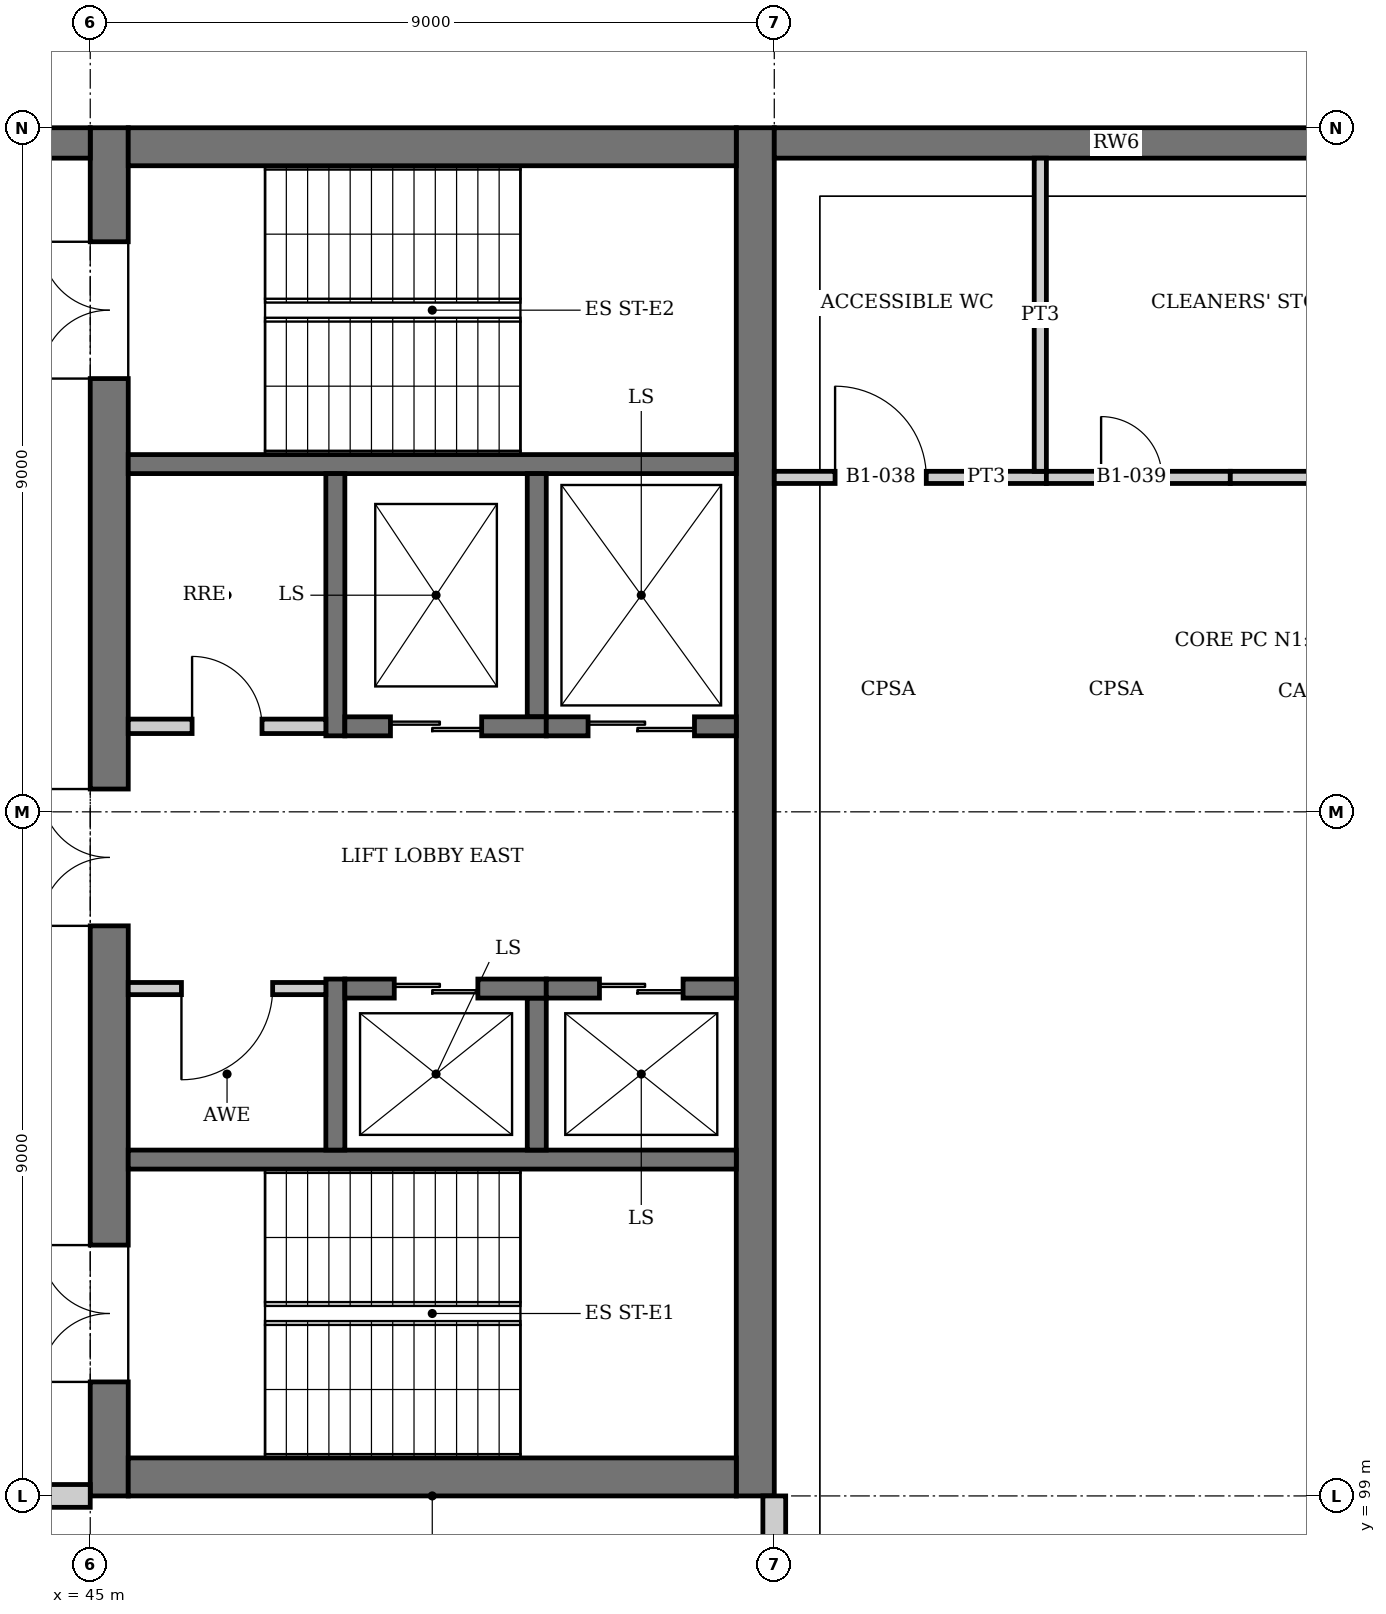
"""IFC4 building model, lengths in metres.
Left out: names, types, materials, properties, quantities, classifications, styles, units other than length and angle.
Written with IfcOpenShell. Run it as: python <this file> out.ifc"""

import sys

from ifc_helpers import new_model, si_unit, direction, frame, frame_2d, origin, place, context, subcontext, project, spatial, rectangle, extrude, element, fill, save


model = new_model("IFC4")
c1 = context("Model", 3, precision=1e-05, world=origin(), true_north=direction((0.0, 1.0)))
c2 = subcontext(c1, "Body", "Model", "MODEL_VIEW")
j1 = project(units=[si_unit("LENGTHUNIT", "METRE"), si_unit("PLANEANGLEUNIT", "RADIAN")], contexts=[c1])
p1 = place(None, origin())
s1 = spatial("IfcSite", under=j1, at=p1, CompositionType="ELEMENT")
p2 = place(p1, origin())
s2 = spatial("IfcBuilding", under=s1, at=p2, CompositionType="ELEMENT")
p3 = place(p2, frame((0.0, 0.0, -4.5)))
s3 = spatial("IfcBuildingStorey", under=s2, at=p3, CompositionType="ELEMENT", Elevation=-4.5)
p4 = place(p3, frame((45.25, 99.0, 0.0), z_axis=(0.0, 0.0, 1.0), x_axis=(0.0, 1.0, 0.0)))
e1 = element("IfcWall", 1, at=p4, inside=s3, PredefinedType="SHEAR", context=c2, shape_type="SweptSolid", body=[
    extrude(rectangle(XDim=18.0, YDim=0.5, at=frame_2d((9.0, 0.0))), origin(), (0.0, 0.0, 1.0), 4.5),
])
p5 = place(p4, frame((1.5, 0.0, 0.0)))
e2 = element("IfcOpeningElement", 2, at=p5, cuts=e1, PredefinedType="OPENING", context=c2, shape_type="SweptSolid", body=[
    extrude(rectangle(XDim=1.8, YDim=2.1, at=frame_2d((0.9, 1.05))), frame((0.0, 0.26, 0.0), z_axis=(0.0, -1.0, 0.0), x_axis=(1.0, 0.0, 0.0)), (0.0, 0.0, 1.0), 0.52),
])
p6 = place(p4, frame((14.7, 0.0, 0.0)))
e3 = element("IfcOpeningElement", 3, at=p6, cuts=e1, PredefinedType="OPENING", context=c2, shape_type="SweptSolid", body=[
    extrude(rectangle(XDim=1.8, YDim=2.1, at=frame_2d((0.9, 1.05))), frame((0.0, 0.26, 0.0), z_axis=(0.0, -1.0, 0.0), x_axis=(1.0, 0.0, 0.0)), (0.0, 0.0, 1.0), 0.52),
])
p7 = place(p4, frame((7.5, 0.0, 0.0)))
e4 = element("IfcOpeningElement", 4, at=p7, cuts=e1, PredefinedType="OPENING", context=c2, shape_type="SweptSolid", body=[
    extrude(rectangle(XDim=1.8, YDim=2.1, at=frame_2d((0.9, 1.05))), frame((0.0, 0.26, 0.0), z_axis=(0.0, -1.0, 0.0), x_axis=(1.0, 0.0, 0.0)), (0.0, 0.0, 1.0), 0.52),
])
p8 = place(p3, frame((53.75, 99.0, 0.0), z_axis=(0.0, 0.0, 1.0), x_axis=(0.0, 1.0, 0.0)))
e5 = element("IfcWall", 5, at=p8, inside=s3, PredefinedType="SHEAR", context=c2, shape_type="SweptSolid", body=[
    extrude(rectangle(XDim=18.0, YDim=0.5, at=frame_2d((9.0, 0.0))), origin(), (0.0, 0.0, 1.0), 4.5),
])
for number, where, z_axis, x_axis in (
    (6, (45.5, 99.25, 0.0), (0.0, 0.0, 1.0), (1.0, 0.0, 0.0)),
    (7, (45.5, 116.75, 0.0), (0.0, 0.0, 1.0), (1.0, 0.0, 0.0)),
):
    element("IfcWall", number, at=place(p3, frame(where, z_axis=z_axis, x_axis=x_axis)), inside=s3, PredefinedType="SHEAR", context=c2, shape_type="SweptSolid", body=[
        extrude(rectangle(XDim=8.0, YDim=0.5, at=frame_2d((4.0, 0.0))), origin(), (0.0, 0.0, 1.0), 4.5),
    ])
p9 = place(p3, frame((36.2, 116.8, 0.0), z_axis=(0.0, 0.0, 1.0), x_axis=(1.0, 0.0, 0.0)))
e8 = element("IfcWall", 8, at=p9, inside=s3, PredefinedType="SOLIDWALL", context=c2, shape_type="SweptSolid", body=[
    extrude(rectangle(XDim=8.8, YDim=0.4, at=frame_2d((4.4, 0.0))), origin(), (0.0, 0.0, 1.0), 4.5),
])
p10 = place(p3, frame((54.0, 116.8, 0.0), z_axis=(0.0, 0.0, 1.0), x_axis=(1.0, 0.0, 0.0)))
e9 = element("IfcWall", 9, at=p10, inside=s3, PredefinedType="SOLIDWALL", context=c2, shape_type="SweptSolid", body=[
    extrude(rectangle(XDim=9.0, YDim=0.4, at=frame_2d((4.5, 0.0))), origin(), (0.0, 0.0, 1.0), 4.5),
])
p11 = place(p3, frame((36.25, 99.0, 0.0), z_axis=(0.0, 0.0, 1.0), x_axis=(1.0, 0.0, 0.0)))
e10 = element("IfcWall", 10, at=p11, inside=s3, PredefinedType="PARTITIONING", context=c2, shape_type="SweptSolid", body=[
    extrude(rectangle(XDim=8.75, YDim=0.3, at=frame_2d((4.375, 0.0))), origin(), (0.0, 0.0, 1.0), 3.34),
])
p12 = place(p11, frame((6.3, 0.0, 0.0)))
e11 = element("IfcOpeningElement", 11, at=p12, cuts=e10, PredefinedType="OPENING", context=c2, shape_type="SweptSolid", body=[
    extrude(rectangle(XDim=1.8, YDim=2.1, at=frame_2d((0.9, 1.05))), frame((0.0, 0.16, 0.0), z_axis=(0.0, -1.0, 0.0), x_axis=(1.0, 0.0, 0.0)), (0.0, 0.0, 1.0), 0.32),
])
p13 = place(p3, frame((54.0, 112.4, 0.0), z_axis=(0.0, 0.0, 1.0), x_axis=(1.0, 0.0, 0.0)))
e12 = element("IfcWall", 12, at=p13, inside=s3, PredefinedType="PARTITIONING", context=c2, shape_type="SweptSolid", body=[
    extrude(rectangle(XDim=3.58, YDim=0.16, at=frame_2d((1.79, 0.0))), origin(), (0.0, 0.0, 1.0), 4.25),
])
p14 = place(p13, frame((0.8, 0.0, 0.0)))
e13 = element("IfcOpeningElement", 13, at=p14, cuts=e12, PredefinedType="OPENING", context=c2, shape_type="SweptSolid", body=[
    extrude(rectangle(XDim=1.2, YDim=2.1, at=frame_2d((0.6, 1.05))), frame((0.0, 0.09, 0.0), z_axis=(0.0, -1.0, 0.0), x_axis=(1.0, 0.0, 0.0)), (0.0, 0.0, 1.0), 0.18),
])
p15 = place(p3, frame((57.58, 112.4, 0.0), z_axis=(0.0, 0.0, 1.0), x_axis=(1.0, 0.0, 0.0)))
e14 = element("IfcWall", 14, at=p15, inside=s3, PredefinedType="PARTITIONING", context=c2, shape_type="SweptSolid", body=[
    extrude(rectangle(XDim=2.42, YDim=0.16, at=frame_2d((1.21, 0.0))), origin(), (0.0, 0.0, 1.0), 3.79),
])
p16 = place(p15, frame((0.72, 0.0, 0.0)))
e15 = element("IfcOpeningElement", 15, at=p16, cuts=e14, PredefinedType="OPENING", context=c2, shape_type="SweptSolid", body=[
    extrude(rectangle(XDim=0.8, YDim=2.0, at=frame_2d((0.4, 1.0))), frame((0.0, 0.09, 0.0), z_axis=(0.0, -1.0, 0.0), x_axis=(1.0, 0.0, 0.0)), (0.0, 0.0, 1.0), 0.18),
])
p17 = place(p3, frame((60.0, 112.4, 0.0), z_axis=(0.0, 0.0, 1.0), x_axis=(1.0, 0.0, 0.0)))
e16 = element("IfcWall", 16, at=p17, inside=s3, PredefinedType="PARTITIONING", context=c2, shape_type="SweptSolid", body=[
    extrude(rectangle(XDim=3.0, YDim=0.16, at=frame_2d((1.5, 0.0))), origin(), (0.0, 0.0, 1.0), 4.25),
])
p18 = place(p3, frame((54.0, 95.55, 0.0), z_axis=(0.0, 0.0, 1.0), x_axis=(0.0, 1.0, 0.0)))
e17 = element("IfcWall", 17, at=p18, inside=s3, PredefinedType="PARTITIONING", context=c2, shape_type="SweptSolid", body=[
    extrude(rectangle(XDim=3.45, YDim=0.3, at=frame_2d((1.725, 0.0))), origin(), (0.0, 0.0, 1.0), 3.638),
])
p19 = place(p18, frame((0.65, 0.0, 0.0)))
e18 = element("IfcOpeningElement", 18, at=p19, cuts=e17, PredefinedType="OPENING", context=c2, shape_type="SweptSolid", body=[
    extrude(rectangle(XDim=1.8, YDim=2.1, at=frame_2d((0.9, 1.05))), frame((0.0, 0.16, 0.0), z_axis=(0.0, -1.0, 0.0), x_axis=(1.0, 0.0, 0.0)), (0.0, 0.0, 1.0), 0.32),
])
p20 = place(p3, frame((57.5, 112.48, 0.0), z_axis=(0.0, 0.0, 1.0), x_axis=(0.0, 1.0, 0.0)))
e19 = element("IfcWall", 19, at=p20, inside=s3, PredefinedType="PARTITIONING", context=c2, shape_type="SweptSolid", body=[
    extrude(rectangle(XDim=4.12, YDim=0.16, at=frame_2d((2.06, 0.0))), origin(), (0.0, 0.0, 1.0), 4.25),
])
for number, where, z_axis, x_axis in (
    (20, (45.5, 103.425, 0.0), (0.0, 0.0, 1.0), (1.0, 0.0, 0.0)),
    (21, (45.5, 112.575, 0.0), (0.0, 0.0, 1.0), (1.0, 0.0, 0.0)),
):
    element("IfcWall", number, at=place(p3, frame(where, z_axis=z_axis, x_axis=x_axis)), inside=s3, PredefinedType="SOLIDWALL", context=c2, shape_type="SweptSolid", body=[
        extrude(rectangle(XDim=8.0, YDim=0.25, at=frame_2d((4.0, 0.0))), origin(), (0.0, 0.0, 1.0), 4.25),
    ])
p21 = place(p3, frame((48.225, 103.55, 0.0), z_axis=(0.0, 0.0, 1.0), x_axis=(0.0, 1.0, 0.0)))
e22 = element("IfcWall", 22, at=p21, inside=s3, PredefinedType="SOLIDWALL", context=c2, shape_type="SweptSolid", body=[
    extrude(rectangle(XDim=2.25, YDim=0.25, at=frame_2d((1.125, 0.0))), origin(), (0.0, 0.0, 1.0), 4.5),
])
p22 = place(p3, frame((50.875, 103.55, 0.0), z_axis=(0.0, 0.0, 1.0), x_axis=(0.0, 1.0, 0.0)))
e23 = element("IfcWall", 23, at=p22, inside=s3, PredefinedType="SOLIDWALL", context=c2, shape_type="SweptSolid", body=[
    extrude(rectangle(XDim=2.0, YDim=0.25, at=frame_2d((1.0, 0.0))), origin(), (0.0, 0.0, 1.0), 4.5),
])
p23 = place(p3, frame((48.35, 105.675, 0.0), z_axis=(0.0, 0.0, 1.0), x_axis=(1.0, 0.0, 0.0)))
e24 = element("IfcWall", 24, at=p23, inside=s3, PredefinedType="SOLIDWALL", context=c2, shape_type="SweptSolid", body=[
    extrude(rectangle(XDim=2.65, YDim=0.25, at=frame_2d((1.325, 0.0))), origin(), (0.0, 0.0, 1.0), 4.5),
])
p24 = place(p23, frame((0.65, 0.0, 0.0)))
e25 = element("IfcOpeningElement", 25, at=p24, cuts=e24, PredefinedType="OPENING", context=c2, shape_type="SweptSolid", body=[
    extrude(rectangle(XDim=1.1, YDim=2.1, at=frame_2d((0.55, 1.05))), frame((0.0, 0.135, 0.0), z_axis=(0.0, -1.0, 0.0), x_axis=(1.0, 0.0, 0.0)), (0.0, 0.0, 1.0), 0.27),
])
p25 = place(p3, frame((51.0, 105.675, 0.0), z_axis=(0.0, 0.0, 1.0), x_axis=(1.0, 0.0, 0.0)))
e26 = element("IfcWall", 26, at=p25, inside=s3, PredefinedType="SOLIDWALL", context=c2, shape_type="SweptSolid", body=[
    extrude(rectangle(XDim=2.5, YDim=0.25, at=frame_2d((1.25, 0.0))), origin(), (0.0, 0.0, 1.0), 4.5),
])
p26 = place(p25, frame((0.7, 0.0, 0.0)))
e27 = element("IfcOpeningElement", 27, at=p26, cuts=e26, PredefinedType="OPENING", context=c2, shape_type="SweptSolid", body=[
    extrude(rectangle(XDim=1.1, YDim=2.1, at=frame_2d((0.55, 1.05))), frame((0.0, 0.135, 0.0), z_axis=(0.0, -1.0, 0.0), x_axis=(1.0, 0.0, 0.0)), (0.0, 0.0, 1.0), 0.27),
])
p27 = place(p3, frame((48.225, 109.0, 0.0), z_axis=(0.0, 0.0, 1.0), x_axis=(0.0, 1.0, 0.0)))
e28 = element("IfcWall", 28, at=p27, inside=s3, PredefinedType="SOLIDWALL", context=c2, shape_type="SweptSolid", body=[
    extrude(rectangle(XDim=3.45, YDim=0.25, at=frame_2d((1.725, 0.0))), origin(), (0.0, 0.0, 1.0), 4.5),
])
p28 = place(p3, frame((50.875, 109.25, 0.0), z_axis=(0.0, 0.0, 1.0), x_axis=(0.0, 1.0, 0.0)))
e29 = element("IfcWall", 29, at=p28, inside=s3, PredefinedType="SOLIDWALL", context=c2, shape_type="SweptSolid", body=[
    extrude(rectangle(XDim=3.2, YDim=0.25, at=frame_2d((1.6, 0.0))), origin(), (0.0, 0.0, 1.0), 4.5),
])
p29 = place(p3, frame((48.35, 109.125, 0.0), z_axis=(0.0, 0.0, 1.0), x_axis=(1.0, 0.0, 0.0)))
e30 = element("IfcWall", 30, at=p29, inside=s3, PredefinedType="SOLIDWALL", context=c2, shape_type="SweptSolid", body=[
    extrude(rectangle(XDim=2.65, YDim=0.25, at=frame_2d((1.325, 0.0))), origin(), (0.0, 0.0, 1.0), 4.5),
])
p30 = place(p29, frame((0.6, 0.0, 0.0)))
e31 = element("IfcOpeningElement", 31, at=p30, cuts=e30, PredefinedType="OPENING", context=c2, shape_type="SweptSolid", body=[
    extrude(rectangle(XDim=1.2, YDim=2.1, at=frame_2d((0.6, 1.05))), frame((0.0, 0.135, 0.0), z_axis=(0.0, -1.0, 0.0), x_axis=(1.0, 0.0, 0.0)), (0.0, 0.0, 1.0), 0.27),
])
p31 = place(p3, frame((51.0, 109.125, 0.0), z_axis=(0.0, 0.0, 1.0), x_axis=(1.0, 0.0, 0.0)))
e32 = element("IfcWall", 32, at=p31, inside=s3, PredefinedType="SOLIDWALL", context=c2, shape_type="SweptSolid", body=[
    extrude(rectangle(XDim=2.5, YDim=0.25, at=frame_2d((1.25, 0.0))), origin(), (0.0, 0.0, 1.0), 4.5),
])
p32 = place(p31, frame((0.55, 0.0, 0.0)))
e33 = element("IfcOpeningElement", 33, at=p32, cuts=e32, PredefinedType="OPENING", context=c2, shape_type="SweptSolid", body=[
    extrude(rectangle(XDim=1.4, YDim=2.4, at=frame_2d((0.7, 1.2))), frame((0.0, 0.135, 0.0), z_axis=(0.0, -1.0, 0.0), x_axis=(1.0, 0.0, 0.0)), (0.0, 0.0, 1.0), 0.27),
])
p33 = place(p3, frame((45.5, 105.675, 0.0), z_axis=(0.0, 0.0, 1.0), x_axis=(1.0, 0.0, 0.0)))
e34 = element("IfcWall", 34, at=p33, inside=s3, PredefinedType="PARTITIONING", context=c2, shape_type="SweptSolid", body=[
    extrude(rectangle(XDim=2.6, YDim=0.16, at=frame_2d((1.3, 0.0))), origin(), (0.0, 0.0, 1.0), 4.25),
])
p34 = place(p33, frame((0.7, 0.0, 0.0)))
e35 = element("IfcOpeningElement", 35, at=p34, cuts=e34, PredefinedType="OPENING", context=c2, shape_type="SweptSolid", body=[
    extrude(rectangle(XDim=1.2, YDim=2.1, at=frame_2d((0.6, 1.05))), frame((0.0, 0.09, 0.0), z_axis=(0.0, -1.0, 0.0), x_axis=(1.0, 0.0, 0.0)), (0.0, 0.0, 1.0), 0.18),
])
p35 = place(p3, frame((45.5, 109.125, 0.0), z_axis=(0.0, 0.0, 1.0), x_axis=(1.0, 0.0, 0.0)))
e36 = element("IfcWall", 36, at=p35, inside=s3, PredefinedType="PARTITIONING", context=c2, shape_type="SweptSolid", body=[
    extrude(rectangle(XDim=2.6, YDim=0.19, at=frame_2d((1.3, 0.0))), origin(), (0.0, 0.0, 1.0), 4.25),
])
p36 = place(p35, frame((0.84, 0.0, 0.0)))
e37 = element("IfcOpeningElement", 37, at=p36, cuts=e36, PredefinedType="OPENING", context=c2, shape_type="SweptSolid", body=[
    extrude(rectangle(XDim=0.92, YDim=2.1, at=frame_2d((0.46, 1.05))), frame((0.0, 0.105, 0.0), z_axis=(0.0, -1.0, 0.0), x_axis=(1.0, 0.0, 0.0)), (0.0, 0.0, 1.0), 0.21),
])
p37 = place(p14, origin())
e38 = element("IfcDoor", 38, at=p37, inside=s3, OperationType="SINGLE_SWING_LEFT", PredefinedType="DOOR", context=c2, shape_type="SweptSolid", body=[
    extrude(rectangle(XDim=1.2, YDim=2.1, at=frame_2d((0.6, 1.05))), frame((0.0, 0.025, 0.0), z_axis=(0.0, -1.0, 0.0), x_axis=(1.0, 0.0, 0.0)), (0.0, 0.0, 1.0), 0.05),
])
fill(e13, e38)
p38 = place(p16, origin())
e39 = element("IfcDoor", 39, at=p38, inside=s3, OperationType="SINGLE_SWING_LEFT", PredefinedType="DOOR", context=c2, shape_type="SweptSolid", body=[
    extrude(rectangle(XDim=0.8, YDim=2.0, at=frame_2d((0.4, 1.0))), frame((0.0, 0.025, 0.0), z_axis=(0.0, -1.0, 0.0), x_axis=(1.0, 0.0, 0.0)), (0.0, 0.0, 1.0), 0.05),
])
fill(e15, e39)
p39 = place(p24, origin())
e40 = element("IfcDoor", 40, at=p39, inside=s3, OperationType="DOUBLE_DOOR_SLIDING", PredefinedType="DOOR", context=c2, shape_type="SweptSolid", body=[
    extrude(rectangle(XDim=1.1, YDim=2.1, at=frame_2d((0.55, 1.05))), frame((0.0, 0.025, 0.0), z_axis=(0.0, -1.0, 0.0), x_axis=(1.0, 0.0, 0.0)), (0.0, 0.0, 1.0), 0.05),
])
fill(e25, e40)
p40 = place(p26, origin())
e41 = element("IfcDoor", 41, at=p40, inside=s3, OperationType="DOUBLE_DOOR_SLIDING", PredefinedType="DOOR", context=c2, shape_type="SweptSolid", body=[
    extrude(rectangle(XDim=1.1, YDim=2.1, at=frame_2d((0.55, 1.05))), frame((0.0, 0.025, 0.0), z_axis=(0.0, -1.0, 0.0), x_axis=(1.0, 0.0, 0.0)), (0.0, 0.0, 1.0), 0.05),
])
fill(e27, e41)
p41 = place(p30, origin())
e42 = element("IfcDoor", 42, at=p41, inside=s3, OperationType="DOUBLE_DOOR_SLIDING", PredefinedType="DOOR", context=c2, shape_type="SweptSolid", body=[
    extrude(rectangle(XDim=1.2, YDim=2.1, at=frame_2d((0.6, 1.05))), frame((0.0, 0.025, 0.0), z_axis=(0.0, -1.0, 0.0), x_axis=(1.0, 0.0, 0.0)), (0.0, 0.0, 1.0), 0.05),
])
fill(e31, e42)
p42 = place(p32, origin())
e43 = element("IfcDoor", 43, at=p42, inside=s3, OperationType="DOUBLE_DOOR_SLIDING", PredefinedType="DOOR", context=c2, shape_type="SweptSolid", body=[
    extrude(rectangle(XDim=1.4, YDim=2.4, at=frame_2d((0.7, 1.2))), frame((0.0, 0.025, 0.0), z_axis=(0.0, -1.0, 0.0), x_axis=(1.0, 0.0, 0.0)), (0.0, 0.0, 1.0), 0.05),
])
fill(e33, e43)
p43 = place(p5, origin())
e44 = element("IfcDoor", 44, at=p43, inside=s3, OperationType="DOUBLE_DOOR_SINGLE_SWING", PredefinedType="DOOR", context=c2, shape_type="SweptSolid", body=[
    extrude(rectangle(XDim=1.8, YDim=2.1, at=frame_2d((0.9, 1.05))), frame((0.0, 0.025, 0.0), z_axis=(0.0, -1.0, 0.0), x_axis=(1.0, 0.0, 0.0)), (0.0, 0.0, 1.0), 0.05),
])
fill(e2, e44)
p44 = place(p6, origin())
e45 = element("IfcDoor", 45, at=p44, inside=s3, OperationType="DOUBLE_DOOR_SINGLE_SWING", PredefinedType="DOOR", context=c2, shape_type="SweptSolid", body=[
    extrude(rectangle(XDim=1.8, YDim=2.1, at=frame_2d((0.9, 1.05))), frame((0.0, 0.025, 0.0), z_axis=(0.0, -1.0, 0.0), x_axis=(1.0, 0.0, 0.0)), (0.0, 0.0, 1.0), 0.05),
])
fill(e3, e45)
p45 = place(p7, origin())
e46 = element("IfcDoor", 46, at=p45, inside=s3, OperationType="DOUBLE_DOOR_SINGLE_SWING", PredefinedType="DOOR", context=c2, shape_type="SweptSolid", body=[
    extrude(rectangle(XDim=1.8, YDim=2.1, at=frame_2d((0.9, 1.05))), frame((0.0, 0.025, 0.0), z_axis=(0.0, -1.0, 0.0), x_axis=(1.0, 0.0, 0.0)), (0.0, 0.0, 1.0), 0.05),
])
fill(e4, e46)
p46 = place(p34, frame((1.2, 0.0, 0.0), z_axis=(0.0, 0.0, 1.0), x_axis=(-1.0, 0.0, 0.0)))
e47 = element("IfcDoor", 47, at=p46, inside=s3, OperationType="SINGLE_SWING_RIGHT", PredefinedType="DOOR", context=c2, shape_type="SweptSolid", body=[
    extrude(rectangle(XDim=1.2, YDim=2.1, at=frame_2d((0.6, 1.05))), frame((0.0, 0.025, 0.0), z_axis=(0.0, -1.0, 0.0), x_axis=(1.0, 0.0, 0.0)), (0.0, 0.0, 1.0), 0.05),
])
fill(e35, e47)
p47 = place(p36, origin())
e48 = element("IfcDoor", 48, at=p47, inside=s3, OperationType="SINGLE_SWING_LEFT", PredefinedType="DOOR", context=c2, shape_type="SweptSolid", body=[
    extrude(rectangle(XDim=0.92, YDim=2.1, at=frame_2d((0.46, 1.05))), frame((0.0, 0.025, 0.0), z_axis=(0.0, -1.0, 0.0), x_axis=(1.0, 0.0, 0.0)), (0.0, 0.0, 1.0), 0.05),
])
fill(e37, e48)
save(model, sys.argv[1])
